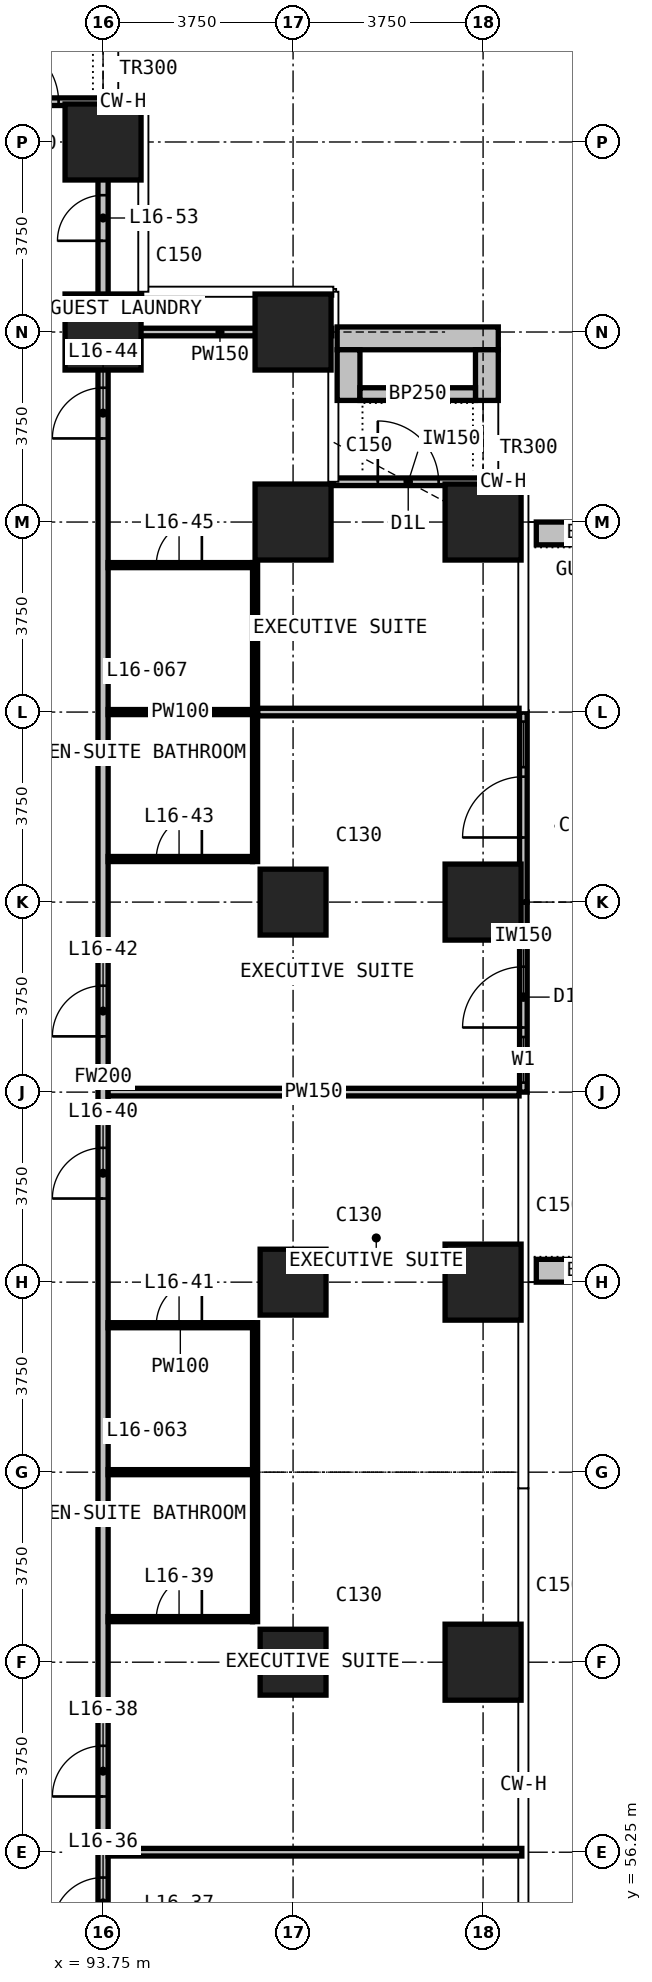
"""IFC4 building model, lengths in metres.
Left out: names, types, materials, properties, quantities, classifications, styles, units other than length and angle.
Written with IfcOpenShell. Run it as: python <this file> out.ifc"""

import sys

from ifc_helpers import new_model, si_unit, direction, frame, frame_2d, origin, origin_2d, place, context, subcontext, project, spatial, rectangle, extrude, element, fill, save


model = new_model("IFC4")
c1 = context("Model", 3, precision=1e-05, world=origin(), true_north=direction((0.0, 1.0)))
c2 = subcontext(c1, "Body", "Model", "MODEL_VIEW")
j1 = project(units=[si_unit("LENGTHUNIT", "METRE"), si_unit("PLANEANGLEUNIT", "RADIAN")], contexts=[c1])
p1 = place(None, origin())
s1 = spatial("IfcSite", under=j1, at=p1, CompositionType="ELEMENT")
p2 = place(p1, origin())
s2 = spatial("IfcBuilding", under=s1, at=p2, CompositionType="ELEMENT")
p3 = place(p2, frame((0.0, 0.0, 72.5)))
s3 = spatial("IfcBuildingStorey", under=s2, at=p3, CompositionType="ELEMENT", Elevation=72.5)
for number, where, z_axis, x_axis in (
    (1, (93.75, 86.25, 0.0), (0.0, 0.0, 1.0), (1.0, 0.0, 0.0)),
    (2, (93.75, 90.0, 0.0), (0.0, 0.0, 1.0), (1.0, 0.0, 0.0)),
):
    element("IfcColumn", number, at=place(p3, frame(where, z_axis=z_axis, x_axis=x_axis)), inside=s3, PredefinedType="COLUMN", context=c2, shape_type="SweptSolid", body=[
        extrude(rectangle(XDim=1.5, YDim=1.5, at=origin_2d()), origin(), (0.0, 0.0, 1.0), 3.3),
    ])
for number, where, z_axis, x_axis in (
    (3, (97.5, 60.0, 0.0), (0.0, 0.0, 1.0), (1.0, 0.0, 0.0)),
    (4, (97.5, 67.5, 0.0), (0.0, 0.0, 1.0), (1.0, 0.0, 0.0)),
    (5, (97.5, 75.0, 0.0), (0.0, 0.0, 1.0), (1.0, 0.0, 0.0)),
):
    element("IfcColumn", number, at=place(p3, frame(where, z_axis=z_axis, x_axis=x_axis)), inside=s3, PredefinedType="COLUMN", context=c2, shape_type="SweptSolid", body=[
        extrude(rectangle(XDim=1.3, YDim=1.3, at=origin_2d()), origin(), (0.0, 0.0, 1.0), 3.3),
    ])
for number, where, z_axis, x_axis in (
    (6, (97.5, 82.5, 0.0), (0.0, 0.0, 1.0), (1.0, 0.0, 0.0)),
    (7, (97.5, 86.25, 0.0), (0.0, 0.0, 1.0), (1.0, 0.0, 0.0)),
    (8, (101.25, 60.0, 0.0), (0.0, 0.0, 1.0), (1.0, 0.0, 0.0)),
    (9, (101.25, 67.5, 0.0), (0.0, 0.0, 1.0), (1.0, 0.0, 0.0)),
    (10, (101.25, 75.0, 0.0), (0.0, 0.0, 1.0), (1.0, 0.0, 0.0)),
    (11, (101.25, 82.5, 0.0), (0.0, 0.0, 1.0), (1.0, 0.0, 0.0)),
):
    element("IfcColumn", number, at=place(p3, frame(where, z_axis=z_axis, x_axis=x_axis)), inside=s3, PredefinedType="COLUMN", context=c2, shape_type="SweptSolid", body=[
        extrude(rectangle(XDim=1.5, YDim=1.5, at=origin_2d()), origin(), (0.0, 0.0, 1.0), 3.3),
    ])
p4 = place(p3, frame((102.045, 71.25, 0.0), z_axis=(0.0, 0.0, 1.0), x_axis=(0.0, 1.0, 0.0)))
e12 = element("IfcWall", 12, at=p4, inside=s3, PredefinedType="SOLIDWALL", context=c2, shape_type="SweptSolid", body=[
    extrude(rectangle(XDim=3.75, YDim=0.15, at=frame_2d((1.875, 0.0))), origin(), (0.0, 0.0, 1.0), 3.0),
])
p5 = place(p4, frame((0.188, 0.0, 0.1)))
e13 = element("IfcOpeningElement", 13, at=p5, cuts=e12, PredefinedType="OPENING", context=c2, shape_type="SweptSolid", body=[
    extrude(rectangle(XDim=0.9, YDim=2.4, at=frame_2d((0.45, 1.2))), frame((0.0, 0.085, 0.0), z_axis=(0.0, -1.0, 0.0), x_axis=(1.0, 0.0, 0.0)), (0.0, 0.0, 1.0), 0.17),
])
p6 = place(p4, frame((1.275, 0.0, 0.0)))
e14 = element("IfcOpeningElement", 14, at=p6, cuts=e12, PredefinedType="OPENING", context=c2, shape_type="SweptSolid", body=[
    extrude(rectangle(XDim=1.2, YDim=2.4, at=frame_2d((0.6, 1.2))), frame((0.0, 0.085, 0.0), z_axis=(0.0, -1.0, 0.0), x_axis=(1.0, 0.0, 0.0)), (0.0, 0.0, 1.0), 0.17),
])
p7 = place(p3, frame((102.045, 75.0, 0.0), z_axis=(0.0, 0.0, 1.0), x_axis=(0.0, 1.0, 0.0)))
e15 = element("IfcWall", 15, at=p7, inside=s3, PredefinedType="SOLIDWALL", context=c2, shape_type="SweptSolid", body=[
    extrude(rectangle(XDim=3.75, YDim=0.15, at=frame_2d((1.875, 0.0))), origin(), (0.0, 0.0, 1.0), 3.0),
])
p8 = place(p7, frame((1.275, 0.0, 0.0)))
e16 = element("IfcOpeningElement", 16, at=p8, cuts=e15, PredefinedType="OPENING", context=c2, shape_type="SweptSolid", body=[
    extrude(rectangle(XDim=1.2, YDim=2.4, at=frame_2d((0.6, 1.2))), frame((0.0, 0.085, 0.0), z_axis=(0.0, -1.0, 0.0), x_axis=(1.0, 0.0, 0.0)), (0.0, 0.0, 1.0), 0.17),
])
p9 = place(p7, frame((2.663, 0.0, 0.1)))
e17 = element("IfcOpeningElement", 17, at=p9, cuts=e15, PredefinedType="OPENING", context=c2, shape_type="SweptSolid", body=[
    extrude(rectangle(XDim=0.9, YDim=2.4, at=frame_2d((0.45, 1.2))), frame((0.0, 0.085, 0.0), z_axis=(0.0, -1.0, 0.0), x_axis=(1.0, 0.0, 0.0)), (0.0, 0.0, 1.0), 0.17),
])
p10 = place(p3, frame((98.295, 83.295, 0.0), z_axis=(0.0, 0.0, 1.0), x_axis=(1.0, 0.0, 0.0)))
e18 = element("IfcWall", 18, at=p10, inside=s3, PredefinedType="SOLIDWALL", context=c2, shape_type="SweptSolid", body=[
    extrude(rectangle(XDim=2.955, YDim=0.15, at=frame_2d((1.478, 0.0))), origin(), (0.0, 0.0, 1.0), 3.0),
])
p11 = place(p10, frame((0.877, 0.0, 0.0)))
e19 = element("IfcOpeningElement", 19, at=p11, cuts=e18, PredefinedType="OPENING", context=c2, shape_type="SweptSolid", body=[
    extrude(rectangle(XDim=1.2, YDim=2.0, at=frame_2d((0.6, 1.0))), frame((0.0, 0.085, 0.0), z_axis=(0.0, -1.0, 0.0), x_axis=(1.0, 0.0, 0.0)), (0.0, 0.0, 1.0), 0.17),
])
p12 = place(p3, frame((90.795, 90.795, 0.0), z_axis=(0.0, 0.0, 1.0), x_axis=(1.0, 0.0, 0.0)))
e20 = element("IfcWall", 20, at=p12, inside=s3, PredefinedType="SOLIDWALL", context=c2, shape_type="SweptSolid", body=[
    extrude(rectangle(XDim=2.955, YDim=0.15, at=frame_2d((1.478, 0.0))), origin(), (0.0, 0.0, 1.0), 3.0),
])
p13 = place(p12, frame((0.877, 0.0, 0.0)))
e21 = element("IfcOpeningElement", 21, at=p13, cuts=e20, PredefinedType="OPENING", context=c2, shape_type="SweptSolid", body=[
    extrude(rectangle(XDim=1.2, YDim=2.4, at=frame_2d((0.6, 1.2))), frame((0.0, 0.085, 0.0), z_axis=(0.0, -1.0, 0.0), x_axis=(1.0, 0.0, 0.0)), (0.0, 0.0, 1.0), 0.17),
])
for number, where, z_axis, x_axis in (
    (22, (102.3, 67.725, 0.0), (0.0, 0.0, 1.0), (1.0, 0.0, 0.0)),
    (23, (102.3, 82.275, 0.0), (0.0, 0.0, 1.0), (1.0, 0.0, 0.0)),
):
    element("IfcWall", number, at=place(p3, frame(where, z_axis=z_axis, x_axis=x_axis)), inside=s3, PredefinedType="USERDEFINED", context=c2, shape_type="SweptSolid", body=[
        extrude(rectangle(XDim=2.35, YDim=0.45, at=frame_2d((1.175, 0.0))), origin(), (0.0, 0.0, 1.0), 1.1),
    ])
p14 = place(p3, frame((98.37, 86.125, 0.0), z_axis=(0.0, 0.0, 1.0), x_axis=(1.0, 0.0, 0.0)))
e24 = element("IfcWall", 24, at=p14, inside=s3, PredefinedType="USERDEFINED", context=c2, shape_type="SweptSolid", body=[
    extrude(rectangle(XDim=3.18, YDim=0.45, at=frame_2d((1.59, 0.0))), origin(), (0.0, 0.0, 1.0), 1.1),
])
for number, where, z_axis, x_axis in (
    (25, (98.595, 84.9, 0.0), (0.0, 0.0, 1.0), (0.0, 1.0, 0.0)),
    (26, (101.325, 84.9, 0.0), (0.0, 0.0, 1.0), (0.0, 1.0, 0.0)),
):
    element("IfcWall", number, at=place(p3, frame(where, z_axis=z_axis, x_axis=x_axis)), inside=s3, PredefinedType="USERDEFINED", context=c2, shape_type="SweptSolid", body=[
        extrude(rectangle(XDim=1.0, YDim=0.45, at=frame_2d((0.5, 0.0))), origin(), (0.0, 0.0, 1.0), 1.1),
    ])
p15 = place(p3, frame((98.82, 85.025, 0.0), z_axis=(0.0, 0.0, 1.0), x_axis=(1.0, 0.0, 0.0)))
e27 = element("IfcWall", 27, at=p15, inside=s3, PredefinedType="USERDEFINED", context=c2, shape_type="SweptSolid", body=[
    extrude(rectangle(XDim=2.28, YDim=0.25, at=frame_2d((1.14, 0.0))), origin(), (0.0, 0.0, 1.0), 1.0),
])
p16 = place(p3, frame((93.75, 52.4, 0.0), z_axis=(0.0, 0.0, 1.0), x_axis=(0.0, 1.0, 0.0)))
e28 = element("IfcWall", 28, at=p16, inside=s3, PredefinedType="PARTITIONING", context=c2, shape_type="SweptSolid", body=[
    extrude(rectangle(XDim=38.31, YDim=0.2, at=frame_2d((19.155, 0.0))), origin(), (0.0, 0.0, 1.0), 3.0),
])
p17 = place(p16, frame((2.35, 0.0, 0.0)))
e29 = element("IfcOpeningElement", 29, at=p17, cuts=e28, PredefinedType="OPENING", context=c2, shape_type="SweptSolid", body=[
    extrude(rectangle(XDim=1.0, YDim=2.2, at=frame_2d((0.5, 1.1))), frame((0.0, 0.11, 0.0), z_axis=(0.0, -1.0, 0.0), x_axis=(1.0, 0.0, 0.0)), (0.0, 0.0, 1.0), 0.22),
])
p18 = place(p16, frame((4.95, 0.0, 0.0)))
e30 = element("IfcOpeningElement", 30, at=p18, cuts=e28, PredefinedType="OPENING", context=c2, shape_type="SweptSolid", body=[
    extrude(rectangle(XDim=1.0, YDim=2.2, at=frame_2d((0.5, 1.1))), frame((0.0, 0.11, 0.0), z_axis=(0.0, -1.0, 0.0), x_axis=(1.0, 0.0, 0.0)), (0.0, 0.0, 1.0), 0.22),
])
p19 = place(p16, frame((16.75, 0.0, 0.0)))
e31 = element("IfcOpeningElement", 31, at=p19, cuts=e28, PredefinedType="OPENING", context=c2, shape_type="SweptSolid", body=[
    extrude(rectangle(XDim=1.0, YDim=2.2, at=frame_2d((0.5, 1.1))), frame((0.0, 0.11, 0.0), z_axis=(0.0, -1.0, 0.0), x_axis=(1.0, 0.0, 0.0)), (0.0, 0.0, 1.0), 0.22),
])
p20 = place(p16, frame((19.95, 0.0, 0.0)))
e32 = element("IfcOpeningElement", 32, at=p20, cuts=e28, PredefinedType="OPENING", context=c2, shape_type="SweptSolid", body=[
    extrude(rectangle(XDim=1.0, YDim=2.2, at=frame_2d((0.5, 1.1))), frame((0.0, 0.11, 0.0), z_axis=(0.0, -1.0, 0.0), x_axis=(1.0, 0.0, 0.0)), (0.0, 0.0, 1.0), 0.22),
])
p21 = place(p16, frame((31.75, 0.0, 0.0)))
e33 = element("IfcOpeningElement", 33, at=p21, cuts=e28, PredefinedType="OPENING", context=c2, shape_type="SweptSolid", body=[
    extrude(rectangle(XDim=1.0, YDim=2.2, at=frame_2d((0.5, 1.1))), frame((0.0, 0.11, 0.0), z_axis=(0.0, -1.0, 0.0), x_axis=(1.0, 0.0, 0.0)), (0.0, 0.0, 1.0), 0.22),
])
p22 = place(p16, frame((35.65, 0.0, 0.0)))
e34 = element("IfcOpeningElement", 34, at=p22, cuts=e28, PredefinedType="OPENING", context=c2, shape_type="SweptSolid", body=[
    extrude(rectangle(XDim=0.9, YDim=2.2, at=frame_2d((0.45, 1.1))), frame((0.0, 0.11, 0.0), z_axis=(0.0, -1.0, 0.0), x_axis=(1.0, 0.0, 0.0)), (0.0, 0.0, 1.0), 0.22),
])
p23 = place(p3, frame((93.85, 56.25, 0.0), z_axis=(0.0, 0.0, 1.0), x_axis=(1.0, 0.0, 0.0)))
e35 = element("IfcWall", 35, at=p23, inside=s3, PredefinedType="PARTITIONING", context=c2, shape_type="SweptSolid", body=[
    extrude(rectangle(XDim=8.165, YDim=0.15, at=frame_2d((4.083, 0.0))), origin(), (0.0, 0.0, 1.0), 3.0),
])
p24 = place(p3, frame((93.85, 71.25, 0.0), z_axis=(0.0, 0.0, 1.0), x_axis=(1.0, 0.0, 0.0)))
e36 = element("IfcWall", 36, at=p24, inside=s3, PredefinedType="PARTITIONING", context=c2, shape_type="SweptSolid", body=[
    extrude(rectangle(XDim=8.11, YDim=0.15, at=frame_2d((4.055, 0.0))), origin(), (0.0, 0.0, 1.0), 3.0),
])
p25 = place(p3, frame((96.8, 78.75, 0.0), z_axis=(0.0, 0.0, 1.0), x_axis=(1.0, 0.0, 0.0)))
e37 = element("IfcWall", 37, at=p25, inside=s3, PredefinedType="PARTITIONING", context=c2, shape_type="SweptSolid", body=[
    extrude(rectangle(XDim=5.16, YDim=0.15, at=frame_2d((2.58, 0.0))), origin(), (0.0, 0.0, 1.0), 3.0),
])
p26 = place(p3, frame((93.85, 86.25, 0.0), z_axis=(0.0, 0.0, 1.0), x_axis=(1.0, 0.0, 0.0)))
e38 = element("IfcWall", 38, at=p26, inside=s3, PredefinedType="PARTITIONING", context=c2, shape_type="SweptSolid", body=[
    extrude(rectangle(XDim=4.415, YDim=0.15, at=frame_2d((2.208, 0.0))), origin(), (0.0, 0.0, 1.0), 3.0),
])
p27 = place(p3, frame((93.85, 60.85, 0.0), z_axis=(0.0, 0.0, 1.0), x_axis=(1.0, 0.0, 0.0)))
e39 = element("IfcWall", 39, at=p27, inside=s3, PredefinedType="PARTITIONING", context=c2, shape_type="SweptSolid", body=[
    extrude(rectangle(XDim=2.85, YDim=0.1, at=frame_2d((1.425, 0.0))), origin(), (0.0, 0.0, 1.0), 3.0),
])
p28 = place(p27, frame((0.95, 0.0, 0.0)))
e40 = element("IfcOpeningElement", 40, at=p28, cuts=e39, PredefinedType="OPENING", context=c2, shape_type="SweptSolid", body=[
    extrude(rectangle(XDim=0.9, YDim=2.2, at=frame_2d((0.45, 1.1))), frame((0.0, 0.06, 0.0), z_axis=(0.0, -1.0, 0.0), x_axis=(1.0, 0.0, 0.0)), (0.0, 0.0, 1.0), 0.12),
])
p29 = place(p3, frame((93.85, 63.75, 0.0), z_axis=(0.0, 0.0, 1.0), x_axis=(1.0, 0.0, 0.0)))
e41 = element("IfcWall", 41, at=p29, inside=s3, PredefinedType="PARTITIONING", context=c2, shape_type="SweptSolid", body=[
    extrude(rectangle(XDim=2.85, YDim=0.1, at=frame_2d((1.425, 0.0))), origin(), (0.0, 0.0, 1.0), 3.0),
])
p30 = place(p3, frame((93.85, 66.65, 0.0), z_axis=(0.0, 0.0, 1.0), x_axis=(1.0, 0.0, 0.0)))
e42 = element("IfcWall", 42, at=p30, inside=s3, PredefinedType="PARTITIONING", context=c2, shape_type="SweptSolid", body=[
    extrude(rectangle(XDim=2.85, YDim=0.1, at=frame_2d((1.425, 0.0))), origin(), (0.0, 0.0, 1.0), 3.0),
])
p31 = place(p30, frame((0.95, 0.0, 0.0)))
e43 = element("IfcOpeningElement", 43, at=p31, cuts=e42, PredefinedType="OPENING", context=c2, shape_type="SweptSolid", body=[
    extrude(rectangle(XDim=0.9, YDim=2.2, at=frame_2d((0.45, 1.1))), frame((0.0, 0.06, 0.0), z_axis=(0.0, -1.0, 0.0), x_axis=(1.0, 0.0, 0.0)), (0.0, 0.0, 1.0), 0.12),
])
p32 = place(p3, frame((93.85, 75.85, 0.0), z_axis=(0.0, 0.0, 1.0), x_axis=(1.0, 0.0, 0.0)))
e44 = element("IfcWall", 44, at=p32, inside=s3, PredefinedType="PARTITIONING", context=c2, shape_type="SweptSolid", body=[
    extrude(rectangle(XDim=2.85, YDim=0.1, at=frame_2d((1.425, 0.0))), origin(), (0.0, 0.0, 1.0), 3.0),
])
p33 = place(p32, frame((0.95, 0.0, 0.0)))
e45 = element("IfcOpeningElement", 45, at=p33, cuts=e44, PredefinedType="OPENING", context=c2, shape_type="SweptSolid", body=[
    extrude(rectangle(XDim=0.9, YDim=2.2, at=frame_2d((0.45, 1.1))), frame((0.0, 0.06, 0.0), z_axis=(0.0, -1.0, 0.0), x_axis=(1.0, 0.0, 0.0)), (0.0, 0.0, 1.0), 0.12),
])
p34 = place(p3, frame((93.85, 78.75, 0.0), z_axis=(0.0, 0.0, 1.0), x_axis=(1.0, 0.0, 0.0)))
e46 = element("IfcWall", 46, at=p34, inside=s3, PredefinedType="PARTITIONING", context=c2, shape_type="SweptSolid", body=[
    extrude(rectangle(XDim=2.85, YDim=0.1, at=frame_2d((1.425, 0.0))), origin(), (0.0, 0.0, 1.0), 3.0),
])
p35 = place(p3, frame((93.85, 81.65, 0.0), z_axis=(0.0, 0.0, 1.0), x_axis=(1.0, 0.0, 0.0)))
e47 = element("IfcWall", 47, at=p35, inside=s3, PredefinedType="PARTITIONING", context=c2, shape_type="SweptSolid", body=[
    extrude(rectangle(XDim=2.85, YDim=0.1, at=frame_2d((1.425, 0.0))), origin(), (0.0, 0.0, 1.0), 3.0),
])
p36 = place(p35, frame((0.95, 0.0, 0.0)))
e48 = element("IfcOpeningElement", 48, at=p36, cuts=e47, PredefinedType="OPENING", context=c2, shape_type="SweptSolid", body=[
    extrude(rectangle(XDim=0.9, YDim=2.2, at=frame_2d((0.45, 1.1))), frame((0.0, 0.06, 0.0), z_axis=(0.0, -1.0, 0.0), x_axis=(1.0, 0.0, 0.0)), (0.0, 0.0, 1.0), 0.12),
])
for number, where, z_axis, x_axis in (
    (49, (96.75, 60.8, 0.0), (0.0, 0.0, 1.0), (0.0, 1.0, 0.0)),
    (50, (96.75, 75.8, 0.0), (0.0, 0.0, 1.0), (0.0, 1.0, 0.0)),
):
    element("IfcWall", number, at=place(p3, frame(where, z_axis=z_axis, x_axis=x_axis)), inside=s3, PredefinedType="PARTITIONING", context=c2, shape_type="SweptSolid", body=[
        extrude(rectangle(XDim=5.9, YDim=0.1, at=frame_2d((2.95, 0.0))), origin(), (0.0, 0.0, 1.0), 3.0),
    ])
p37 = place(p5, origin())
e51 = element("IfcWindow", 51, at=p37, inside=s3, PartitioningType="SINGLE_PANEL", PredefinedType="WINDOW", context=c2, shape_type="SweptSolid", body=[
    extrude(rectangle(XDim=0.9, YDim=2.4, at=frame_2d((0.45, 1.2))), frame((0.0, 0.03, 0.0), z_axis=(0.0, -1.0, 0.0), x_axis=(1.0, 0.0, 0.0)), (0.0, 0.0, 1.0), 0.06),
])
fill(e13, e51)
p38 = place(p6, origin())
e52 = element("IfcDoor", 52, at=p38, inside=s3, OperationType="SINGLE_SWING_LEFT", PredefinedType="DOOR", context=c2, shape_type="SweptSolid", body=[
    extrude(rectangle(XDim=1.2, YDim=2.4, at=frame_2d((0.6, 1.2))), frame((0.0, 0.025, 0.0), z_axis=(0.0, -1.0, 0.0), x_axis=(1.0, 0.0, 0.0)), (0.0, 0.0, 1.0), 0.05),
])
fill(e14, e52)
p39 = place(p8, origin())
e53 = element("IfcDoor", 53, at=p39, inside=s3, OperationType="SINGLE_SWING_LEFT", PredefinedType="DOOR", context=c2, shape_type="SweptSolid", body=[
    extrude(rectangle(XDim=1.2, YDim=2.4, at=frame_2d((0.6, 1.2))), frame((0.0, 0.025, 0.0), z_axis=(0.0, -1.0, 0.0), x_axis=(1.0, 0.0, 0.0)), (0.0, 0.0, 1.0), 0.05),
])
fill(e16, e53)
p40 = place(p9, origin())
e54 = element("IfcWindow", 54, at=p40, inside=s3, PartitioningType="SINGLE_PANEL", PredefinedType="WINDOW", context=c2, shape_type="SweptSolid", body=[
    extrude(rectangle(XDim=0.9, YDim=2.4, at=frame_2d((0.45, 1.2))), frame((0.0, 0.03, 0.0), z_axis=(0.0, -1.0, 0.0), x_axis=(1.0, 0.0, 0.0)), (0.0, 0.0, 1.0), 0.06),
])
fill(e17, e54)
p41 = place(p11, origin())
e55 = element("IfcDoor", 55, at=p41, inside=s3, OperationType="SINGLE_SWING_LEFT", PredefinedType="DOOR", context=c2, shape_type="SweptSolid", body=[
    extrude(rectangle(XDim=1.2, YDim=2.0, at=frame_2d((0.6, 1.0))), frame((0.0, 0.025, 0.0), z_axis=(0.0, -1.0, 0.0), x_axis=(1.0, 0.0, 0.0)), (0.0, 0.0, 1.0), 0.05),
])
fill(e19, e55)
p42 = place(p13, origin())
e56 = element("IfcDoor", 56, at=p42, inside=s3, OperationType="SINGLE_SWING_LEFT", PredefinedType="DOOR", context=c2, shape_type="SweptSolid", body=[
    extrude(rectangle(XDim=1.2, YDim=2.4, at=frame_2d((0.6, 1.2))), frame((0.0, 0.025, 0.0), z_axis=(0.0, -1.0, 0.0), x_axis=(1.0, 0.0, 0.0)), (0.0, 0.0, 1.0), 0.05),
])
fill(e21, e56)
p43 = place(p17, origin())
e57 = element("IfcDoor", 57, at=p43, inside=s3, OperationType="SINGLE_SWING_LEFT", PredefinedType="DOOR", context=c2, shape_type="SweptSolid", body=[
    extrude(rectangle(XDim=1.0, YDim=2.2, at=frame_2d((0.5, 1.1))), frame((0.0, 0.025, 0.0), z_axis=(0.0, -1.0, 0.0), x_axis=(1.0, 0.0, 0.0)), (0.0, 0.0, 1.0), 0.05),
])
fill(e29, e57)
p44 = place(p18, origin())
e58 = element("IfcDoor", 58, at=p44, inside=s3, OperationType="SINGLE_SWING_LEFT", PredefinedType="DOOR", context=c2, shape_type="SweptSolid", body=[
    extrude(rectangle(XDim=1.0, YDim=2.2, at=frame_2d((0.5, 1.1))), frame((0.0, 0.025, 0.0), z_axis=(0.0, -1.0, 0.0), x_axis=(1.0, 0.0, 0.0)), (0.0, 0.0, 1.0), 0.05),
])
fill(e30, e58)
p45 = place(p28, origin())
e59 = element("IfcDoor", 59, at=p45, inside=s3, OperationType="SINGLE_SWING_RIGHT", PredefinedType="DOOR", context=c2, shape_type="SweptSolid", body=[
    extrude(rectangle(XDim=0.9, YDim=2.2, at=frame_2d((0.45, 1.1))), frame((0.0, 0.025, 0.0), z_axis=(0.0, -1.0, 0.0), x_axis=(1.0, 0.0, 0.0)), (0.0, 0.0, 1.0), 0.05),
])
fill(e40, e59)
p46 = place(p19, origin())
e60 = element("IfcDoor", 60, at=p46, inside=s3, OperationType="SINGLE_SWING_LEFT", PredefinedType="DOOR", context=c2, shape_type="SweptSolid", body=[
    extrude(rectangle(XDim=1.0, YDim=2.2, at=frame_2d((0.5, 1.1))), frame((0.0, 0.025, 0.0), z_axis=(0.0, -1.0, 0.0), x_axis=(1.0, 0.0, 0.0)), (0.0, 0.0, 1.0), 0.05),
])
fill(e31, e60)
p47 = place(p31, origin())
e61 = element("IfcDoor", 61, at=p47, inside=s3, OperationType="SINGLE_SWING_RIGHT", PredefinedType="DOOR", context=c2, shape_type="SweptSolid", body=[
    extrude(rectangle(XDim=0.9, YDim=2.2, at=frame_2d((0.45, 1.1))), frame((0.0, 0.025, 0.0), z_axis=(0.0, -1.0, 0.0), x_axis=(1.0, 0.0, 0.0)), (0.0, 0.0, 1.0), 0.05),
])
fill(e43, e61)
p48 = place(p20, origin())
e62 = element("IfcDoor", 62, at=p48, inside=s3, OperationType="SINGLE_SWING_LEFT", PredefinedType="DOOR", context=c2, shape_type="SweptSolid", body=[
    extrude(rectangle(XDim=1.0, YDim=2.2, at=frame_2d((0.5, 1.1))), frame((0.0, 0.025, 0.0), z_axis=(0.0, -1.0, 0.0), x_axis=(1.0, 0.0, 0.0)), (0.0, 0.0, 1.0), 0.05),
])
fill(e32, e62)
p49 = place(p33, origin())
e63 = element("IfcDoor", 63, at=p49, inside=s3, OperationType="SINGLE_SWING_RIGHT", PredefinedType="DOOR", context=c2, shape_type="SweptSolid", body=[
    extrude(rectangle(XDim=0.9, YDim=2.2, at=frame_2d((0.45, 1.1))), frame((0.0, 0.025, 0.0), z_axis=(0.0, -1.0, 0.0), x_axis=(1.0, 0.0, 0.0)), (0.0, 0.0, 1.0), 0.05),
])
fill(e45, e63)
p50 = place(p21, origin())
e64 = element("IfcDoor", 64, at=p50, inside=s3, OperationType="SINGLE_SWING_LEFT", PredefinedType="DOOR", context=c2, shape_type="SweptSolid", body=[
    extrude(rectangle(XDim=1.0, YDim=2.2, at=frame_2d((0.5, 1.1))), frame((0.0, 0.025, 0.0), z_axis=(0.0, -1.0, 0.0), x_axis=(1.0, 0.0, 0.0)), (0.0, 0.0, 1.0), 0.05),
])
fill(e33, e64)
p51 = place(p36, origin())
e65 = element("IfcDoor", 65, at=p51, inside=s3, OperationType="SINGLE_SWING_RIGHT", PredefinedType="DOOR", context=c2, shape_type="SweptSolid", body=[
    extrude(rectangle(XDim=0.9, YDim=2.2, at=frame_2d((0.45, 1.1))), frame((0.0, 0.025, 0.0), z_axis=(0.0, -1.0, 0.0), x_axis=(1.0, 0.0, 0.0)), (0.0, 0.0, 1.0), 0.05),
])
fill(e48, e65)
p52 = place(p22, origin())
e66 = element("IfcDoor", 66, at=p52, inside=s3, OperationType="SINGLE_SWING_LEFT", PredefinedType="DOOR", context=c2, shape_type="SweptSolid", body=[
    extrude(rectangle(XDim=0.9, YDim=2.2, at=frame_2d((0.45, 1.1))), frame((0.0, 0.025, 0.0), z_axis=(0.0, -1.0, 0.0), x_axis=(1.0, 0.0, 0.0)), (0.0, 0.0, 1.0), 0.05),
])
fill(e34, e66)
save(model, sys.argv[1])
